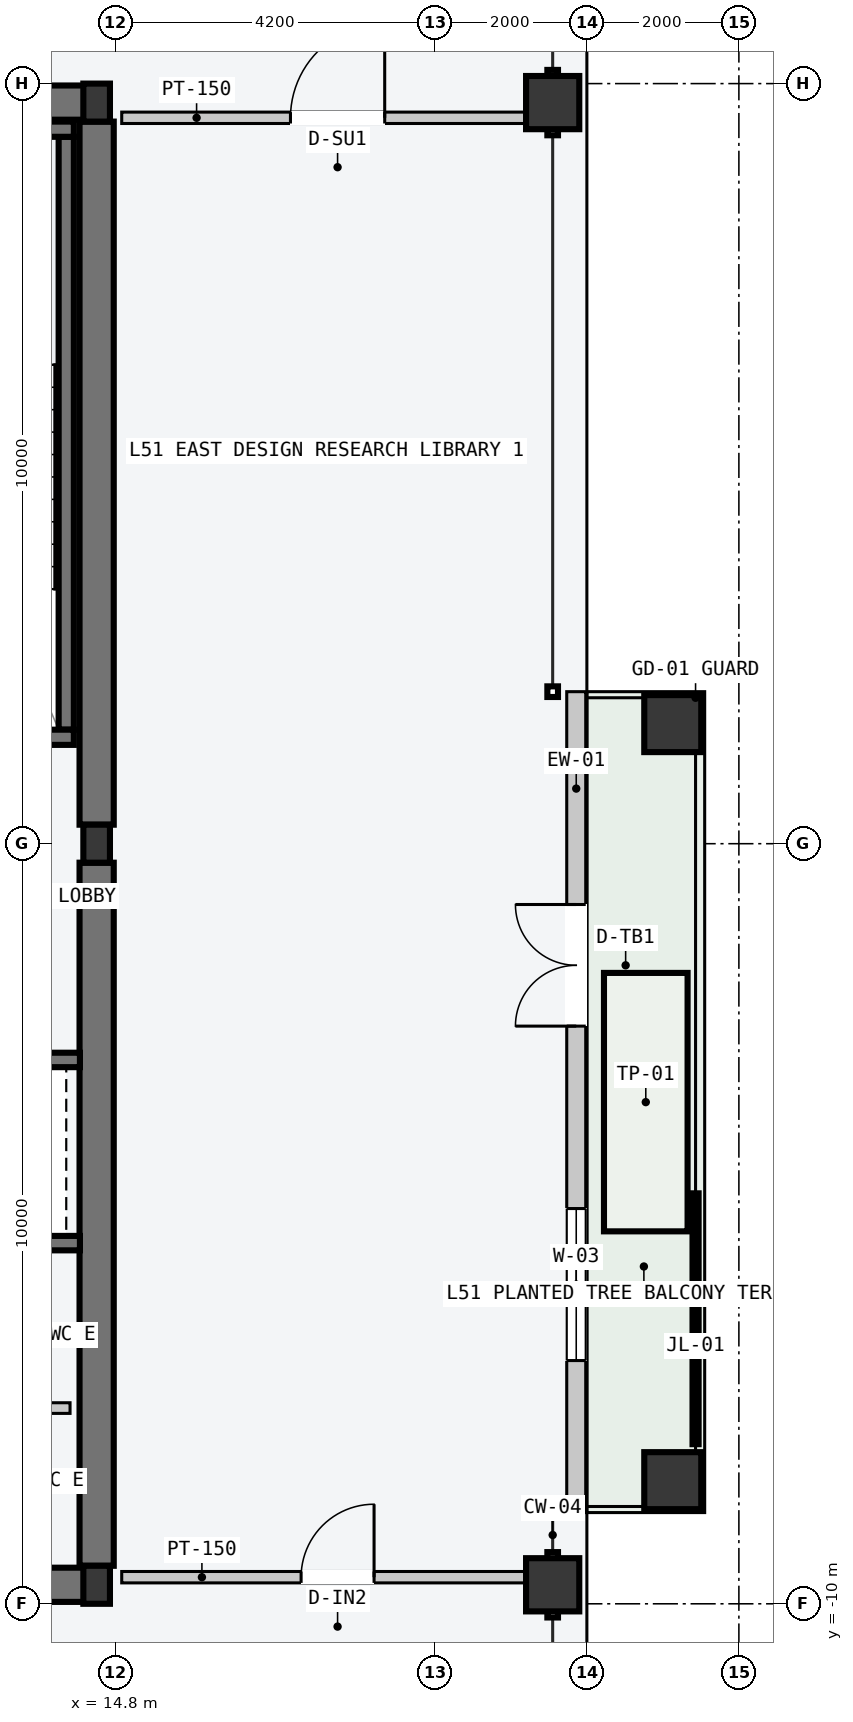
"""IFC4 building model, lengths in metres.
Left out: names, types, materials, properties, quantities, classifications, styles, units other than length and angle.
Written with IfcOpenShell. Run it as: python <this file> out.ifc"""

import sys

from ifc_helpers import new_model, si_unit, direction, frame, frame_2d, origin, origin_2d, place, context, subcontext, project, spatial, rectangle, hollow_rectangle, i_section, extrude, element, fill, save


model = new_model("IFC4")
c1 = context("Model", 3, precision=1e-05, world=origin(), true_north=direction((0.0, 1.0)))
c2 = subcontext(c1, "Body", "Model", "MODEL_VIEW")
j1 = project(units=[si_unit("LENGTHUNIT", "METRE"), si_unit("PLANEANGLEUNIT", "RADIAN")], contexts=[c1])
p1 = place(None, origin())
s1 = spatial("IfcSite", under=j1, at=p1, CompositionType="ELEMENT")
p2 = place(p1, origin())
s2 = spatial("IfcBuilding", under=s1, at=p2, CompositionType="ELEMENT")
p3 = place(p2, frame((0.0, 0.0, 194.7)))
s3 = spatial("IfcBuildingStorey", under=s2, at=p3, CompositionType="ELEMENT", Elevation=194.7)
for number, where, z_axis, x_axis in (
    (1, (8.07, -9.75, -0.2), (0.0, 0.0, 1.0), (1.0, 0.0, 0.0)),
    (2, (8.07, 9.75, -0.2), (0.0, 0.0, 1.0), (1.0, 0.0, 0.0)),
):
    element("IfcWall", number, at=place(p3, frame(where, z_axis=z_axis, x_axis=x_axis)), inside=s3, PredefinedType="SHEAR", context=c2, shape_type="SweptSolid", body=[
        extrude(rectangle(XDim=6.46, YDim=0.45, at=frame_2d((3.23, 0.0))), origin(), (0.0, 0.0, 1.0), 3.6),
    ])
for number, where, z_axis, x_axis in (
    (3, (14.55, -9.5, -0.2), (0.0, 0.0, 1.0), (0.0, 1.0, 0.0)),
    (4, (14.55, 0.25, -0.2), (0.0, 0.0, 1.0), (0.0, 1.0, 0.0)),
):
    element("IfcWall", number, at=place(p3, frame(where, z_axis=z_axis, x_axis=x_axis)), inside=s3, PredefinedType="SHEAR", context=c2, shape_type="SweptSolid", body=[
        extrude(rectangle(XDim=9.25, YDim=0.45, at=frame_2d((4.625, 0.0))), origin(), (0.0, 0.0, 1.0), 3.6),
    ])
p4 = place(p3, frame((14.15, 1.5, -0.2), z_axis=(0.0, 0.0, 1.0), x_axis=(0.0, 1.0, 0.0)))
e5 = element("IfcWall", 5, at=p4, inside=s3, PredefinedType="SOLIDWALL", context=c2, shape_type="SweptSolid", body=[
    extrude(rectangle(XDim=7.8, YDim=0.2, at=frame_2d((3.9, 0.0))), origin(), (0.0, 0.0, 1.0), 3.6),
])
p5 = place(p3, frame((10.53, 1.4, -0.2), z_axis=(0.0, 0.0, 1.0), x_axis=(1.0, 0.0, 0.0)))
e6 = element("IfcWall", 6, at=p5, inside=s3, PredefinedType="SOLIDWALL", context=c2, shape_type="SweptSolid", body=[
    extrude(rectangle(XDim=3.72, YDim=0.2, at=frame_2d((1.86, 0.0))), origin(), (0.0, 0.0, 1.0), 3.6),
])
p6 = place(p5, frame((1.5, 0.0, 0.2)))
e7 = element("IfcOpeningElement", 7, at=p6, cuts=e6, PredefinedType="OPENING", context=c2, shape_type="SweptSolid", body=[
    extrude(rectangle(XDim=1.12, YDim=2.18, at=frame_2d((0.56, 1.09))), frame((0.0, 0.11, 0.0), z_axis=(0.0, -1.0, 0.0), x_axis=(1.0, 0.0, 0.0)), (0.0, 0.0, 1.0), 0.22),
])
p7 = place(p3, frame((10.53, 9.4, -0.2), z_axis=(0.0, 0.0, 1.0), x_axis=(1.0, 0.0, 0.0)))
e8 = element("IfcWall", 8, at=p7, inside=s3, PredefinedType="SOLIDWALL", context=c2, shape_type="SweptSolid", body=[
    extrude(rectangle(XDim=3.72, YDim=0.2, at=frame_2d((1.86, 0.0))), origin(), (0.0, 0.0, 1.0), 3.6),
])
for number, where, z_axis, x_axis in (
    (9, (14.55, -9.75, 0.0), (0.0, 0.0, 1.0), (1.0, 0.0, 0.0)),
    (10, (14.55, 0.0, 0.0), (0.0, 0.0, 1.0), (1.0, 0.0, 0.0)),
    (11, (14.55, 9.75, 0.0), (0.0, 0.0, 1.0), (1.0, 0.0, 0.0)),
):
    element("IfcColumn", number, at=place(p3, frame(where, z_axis=z_axis, x_axis=x_axis)), inside=s3, PredefinedType="COLUMN", context=c2, shape_type="SweptSolid", body=[
        extrude(i_section(OverallWidth=0.35, OverallDepth=0.5, WebThickness=0.02, FlangeThickness=0.032, at=origin_2d()), origin(), (0.0, 0.0, 1.0), 3.6),
    ])
for number, where, z_axis, x_axis in (
    (12, (20.55, -9.75, 0.0), (0.0, 0.0, 1.0), (0.0, 1.0, 0.0)),
    (13, (20.55, 9.75, 0.0), (0.0, 0.0, 1.0), (0.0, 1.0, 0.0)),
):
    element("IfcColumn", number, at=place(p3, frame(where, z_axis=z_axis, x_axis=x_axis)), inside=s3, PredefinedType="COLUMN", context=c2, shape_type="SweptSolid", body=[
        extrude(hollow_rectangle(XDim=0.7, YDim=0.7, WallThickness=0.03, at=origin_2d()), origin(), (0.0, 0.0, 1.0), 3.6),
    ])
for number, where, z_axis, x_axis in (
    (14, (22.13, -8.38, 0.0), (0.0, 0.0, 1.0), (0.0, 1.0, 0.0)),
    (15, (22.13, 1.58, 0.0), (0.0, 0.0, 1.0), (0.0, 1.0, 0.0)),
):
    element("IfcColumn", number, at=place(p3, frame(where, z_axis=z_axis, x_axis=x_axis)), inside=s3, PredefinedType="COLUMN", context=c2, shape_type="SweptSolid", body=[
        extrude(hollow_rectangle(XDim=0.75, YDim=0.75, WallThickness=0.032, at=origin_2d()), origin(), (0.0, 0.0, 1.0), 3.6),
    ])
p8 = place(p3, frame((20.86, -8.8, 0.0), z_axis=(0.0, 0.0, 1.0), x_axis=(0.0, 1.0, 0.0)))
e16 = element("IfcWall", 16, at=p8, inside=s3, PredefinedType="STANDARD", context=c2, shape_type="SweptSolid", body=[
    extrude(rectangle(XDim=10.8, YDim=0.25, at=frame_2d((5.4, 0.0))), origin(), (0.0, 0.0, 1.0), 3.4),
])
p9 = place(p8, frame((6.4, 0.0, 0.0)))
e17 = element("IfcOpeningElement", 17, at=p9, cuts=e16, PredefinedType="OPENING", context=c2, shape_type="SweptSolid", body=[
    extrude(rectangle(XDim=1.6, YDim=2.2, at=frame_2d((0.8, 1.1))), frame((0.0, 0.135, 0.0), z_axis=(0.0, -1.0, 0.0), x_axis=(1.0, 0.0, 0.0)), (0.0, 0.0, 1.0), 0.27),
])
p10 = place(p8, frame((2.0, 0.0, 0.85)))
e18 = element("IfcOpeningElement", 18, at=p10, cuts=e16, PredefinedType="OPENING", context=c2, shape_type="SweptSolid", body=[
    extrude(rectangle(XDim=2.0, YDim=2.1, at=frame_2d((1.0, 1.05))), frame((0.0, 0.135, 0.0), z_axis=(0.0, -1.0, 0.0), x_axis=(1.0, 0.0, 0.0)), (0.0, 0.0, 1.0), 0.27),
])
p11 = place(p3, frame((11.65, -2.845, -0.2), z_axis=(0.0, 0.0, 1.0), x_axis=(1.0, 0.0, 0.0)))
e19 = element("IfcWall", 19, at=p11, inside=s3, PredefinedType="SOLIDWALL", context=c2, shape_type="SweptSolid", body=[
    extrude(rectangle(XDim=2.68, YDim=0.19, at=frame_2d((1.34, 0.0))), origin(), (0.0, 0.0, 1.0), 3.6),
])
p12 = place(p11, frame((0.65, 0.0, 0.2)))
e20 = element("IfcOpeningElement", 20, at=p12, cuts=e19, PredefinedType="OPENING", context=c2, shape_type="SweptSolid", body=[
    extrude(rectangle(XDim=1.2, YDim=2.2, at=frame_2d((0.6, 1.1))), frame((0.0, 0.105, 0.0), z_axis=(0.0, -1.0, 0.0), x_axis=(1.0, 0.0, 0.0)), (0.0, 0.0, 1.0), 0.21),
])
p13 = place(p3, frame((11.65, -5.255, -0.2), z_axis=(0.0, 0.0, 1.0), x_axis=(1.0, 0.0, 0.0)))
e21 = element("IfcWall", 21, at=p13, inside=s3, PredefinedType="SOLIDWALL", context=c2, shape_type="SweptSolid", body=[
    extrude(rectangle(XDim=2.68, YDim=0.19, at=frame_2d((1.34, 0.0))), origin(), (0.0, 0.0, 1.0), 3.6),
])
p14 = place(p3, frame((11.7, -7.425, 0.0), z_axis=(0.0, 0.0, 1.0), x_axis=(1.0, 0.0, 0.0)))
e22 = element("IfcWall", 22, at=p14, inside=s3, PredefinedType="PARTITIONING", context=c2, shape_type="SweptSolid", body=[
    extrude(rectangle(XDim=2.5, YDim=0.14, at=frame_2d((1.25, 0.0))), origin(), (0.0, 0.0, 1.0), 3.4),
])
p15 = place(p3, frame((14.88, 9.55, 0.0), z_axis=(0.0, 0.0, 1.0), x_axis=(1.0, 0.0, 0.0)))
e23 = element("IfcWall", 23, at=p15, inside=s3, PredefinedType="PARTITIONING", context=c2, shape_type="SweptSolid", body=[
    extrude(rectangle(XDim=5.68, YDim=0.15, at=frame_2d((2.84, 0.0))), origin(), (0.0, 0.0, 1.0), 3.4),
])
p16 = place(p15, frame((2.22, 0.0, 0.0)))
e24 = element("IfcOpeningElement", 24, at=p16, cuts=e23, PredefinedType="OPENING", context=c2, shape_type="SweptSolid", body=[
    extrude(rectangle(XDim=1.24, YDim=2.24, at=frame_2d((0.62, 1.12))), frame((0.0, 0.085, 0.0), z_axis=(0.0, -1.0, 0.0), x_axis=(1.0, 0.0, 0.0)), (0.0, 0.0, 1.0), 0.17),
])
p17 = place(p3, frame((14.88, -9.65, 0.0), z_axis=(0.0, 0.0, 1.0), x_axis=(1.0, 0.0, 0.0)))
e25 = element("IfcWall", 25, at=p17, inside=s3, PredefinedType="PARTITIONING", context=c2, shape_type="SweptSolid", body=[
    extrude(rectangle(XDim=5.68, YDim=0.15, at=frame_2d((2.84, 0.0))), origin(), (0.0, 0.0, 1.0), 2.75),
])
p18 = place(p17, frame((2.36, 0.0, 0.0)))
e26 = element("IfcOpeningElement", 26, at=p18, cuts=e25, PredefinedType="OPENING", context=c2, shape_type="SweptSolid", body=[
    extrude(rectangle(XDim=0.96, YDim=2.18, at=frame_2d((0.48, 1.09))), frame((0.0, 0.085, 0.0), z_axis=(0.0, -1.0, 0.0), x_axis=(1.0, 0.0, 0.0)), (0.0, 0.0, 1.0), 0.17),
])
p19 = place(p9, origin())
e27 = element("IfcDoor", 27, at=p19, inside=s3, OperationType="DOUBLE_DOOR_SINGLE_SWING", PredefinedType="DOOR", context=c2, shape_type="SweptSolid", body=[
    extrude(rectangle(XDim=1.6, YDim=2.2, at=frame_2d((0.8, 1.1))), frame((0.0, 0.025, 0.0), z_axis=(0.0, -1.0, 0.0), x_axis=(1.0, 0.0, 0.0)), (0.0, 0.0, 1.0), 0.05),
])
fill(e17, e27)
p20 = place(p10, origin())
e28 = element("IfcWindow", 28, at=p20, inside=s3, PartitioningType="SINGLE_PANEL", PredefinedType="WINDOW", context=c2, shape_type="SweptSolid", body=[
    extrude(rectangle(XDim=2.0, YDim=2.1, at=frame_2d((1.0, 1.05))), frame((0.0, 0.03, 0.0), z_axis=(0.0, -1.0, 0.0), x_axis=(1.0, 0.0, 0.0)), (0.0, 0.0, 1.0), 0.06),
])
fill(e18, e28)
p21 = place(p16, origin())
e29 = element("IfcDoor", 29, at=p21, inside=s3, OperationType="SINGLE_SWING_RIGHT", PredefinedType="DOOR", context=c2, shape_type="SweptSolid", body=[
    extrude(rectangle(XDim=1.24, YDim=2.24, at=frame_2d((0.62, 1.12))), frame((0.0, 0.025, 0.0), z_axis=(0.0, -1.0, 0.0), x_axis=(1.0, 0.0, 0.0)), (0.0, 0.0, 1.0), 0.05),
])
fill(e24, e29)
p22 = place(p18, origin())
e30 = element("IfcDoor", 30, at=p22, inside=s3, OperationType="SINGLE_SWING_RIGHT", PredefinedType="DOOR", context=c2, shape_type="SweptSolid", body=[
    extrude(rectangle(XDim=0.96, YDim=2.18, at=frame_2d((0.48, 1.09))), frame((0.0, 0.025, 0.0), z_axis=(0.0, -1.0, 0.0), x_axis=(1.0, 0.0, 0.0)), (0.0, 0.0, 1.0), 0.05),
])
fill(e26, e30)
save(model, sys.argv[1])
